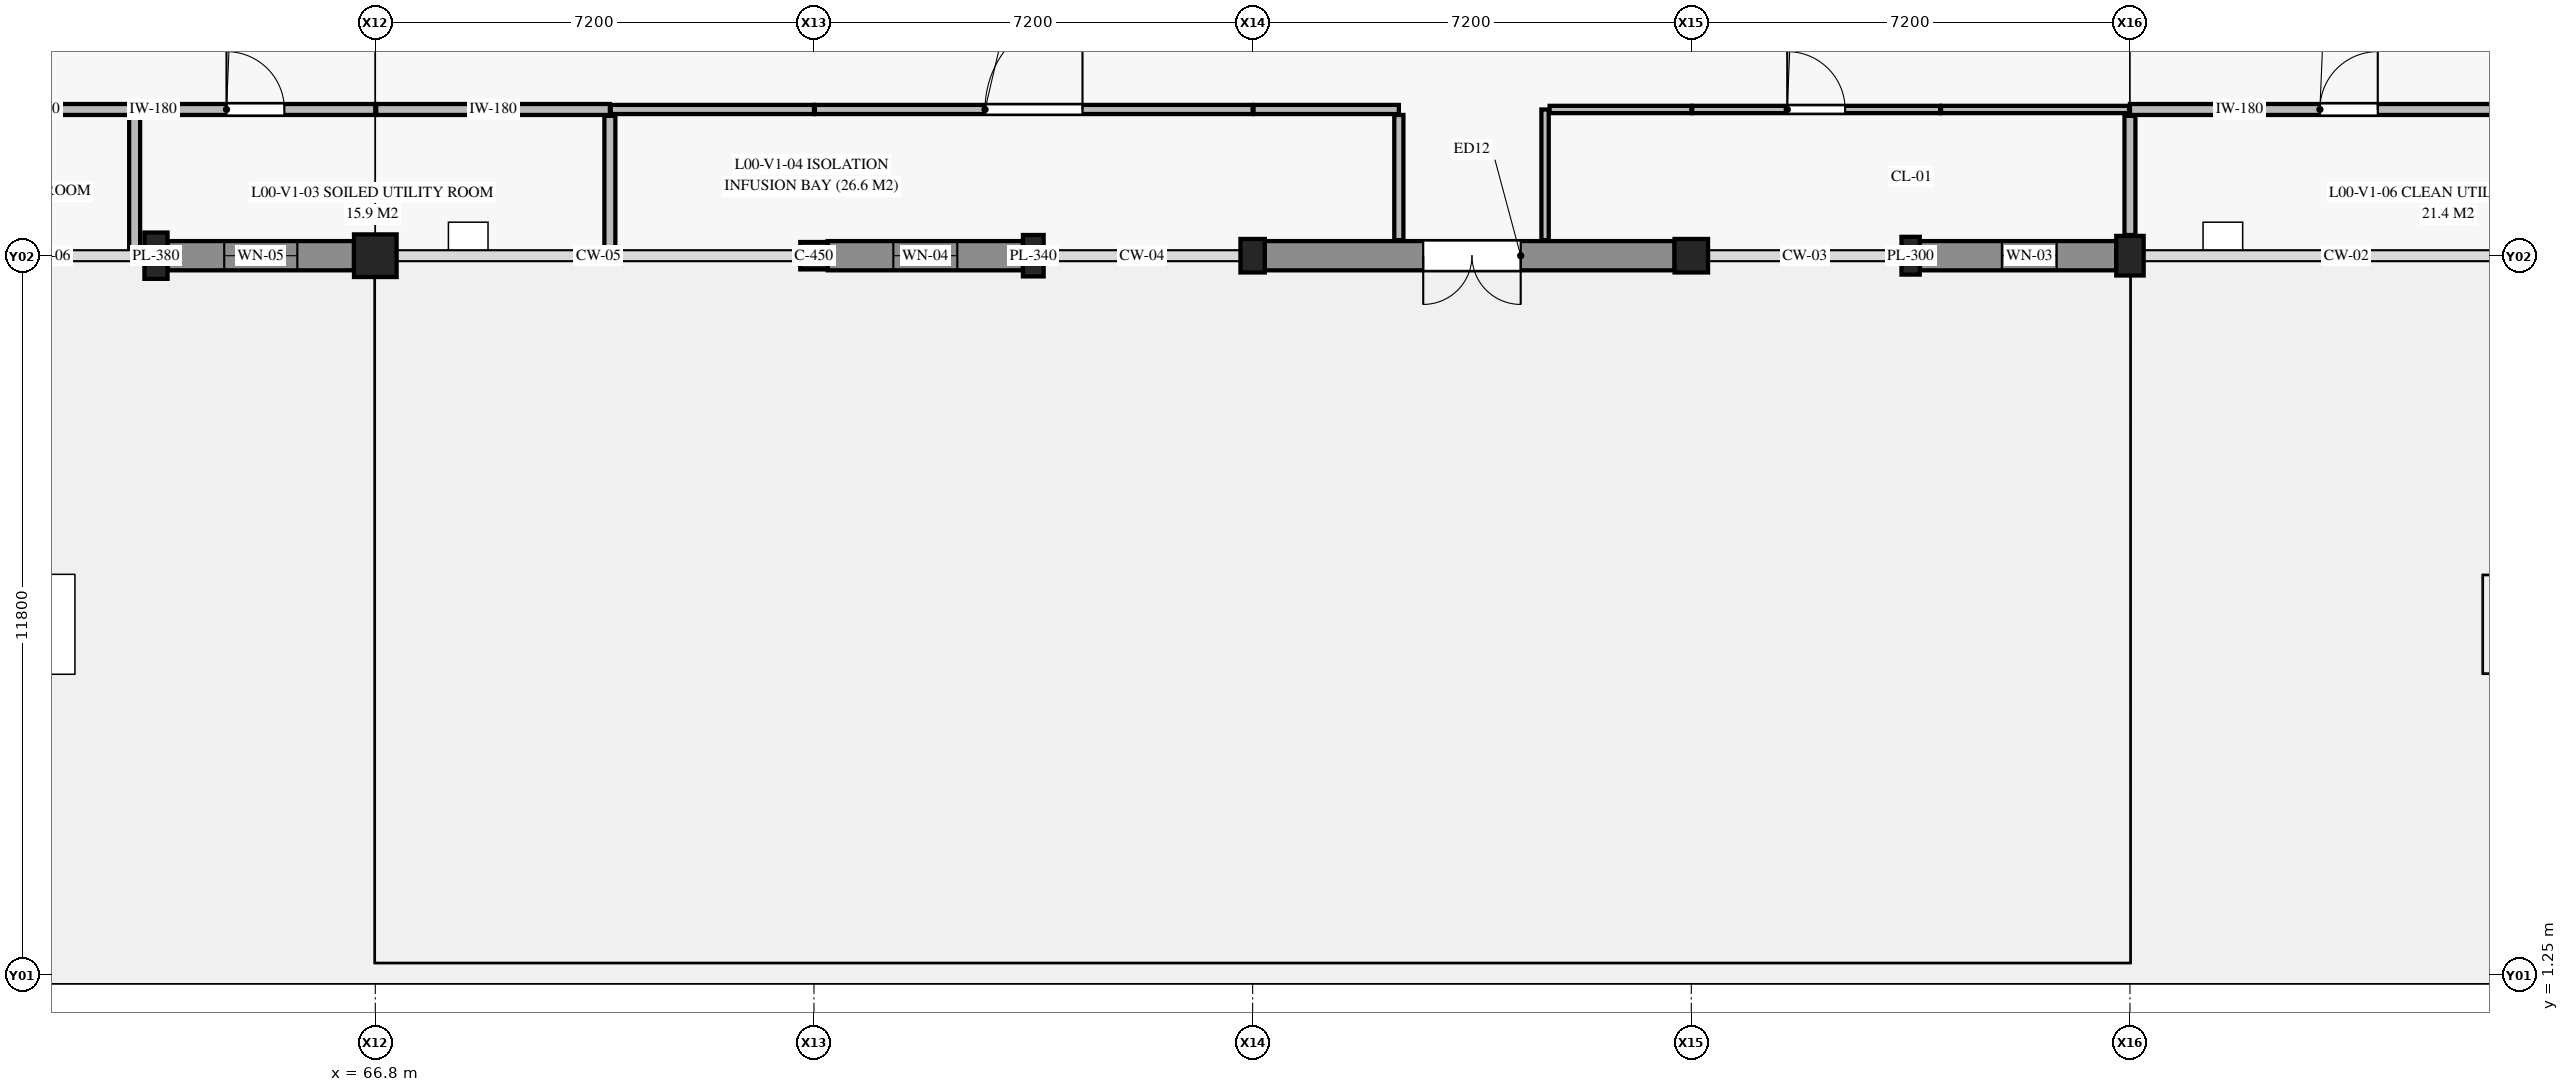
"""IFC4 building model, lengths in metres.
Left out: names, types, materials, properties, quantities, classifications, styles, units other than length and angle.
Written with IfcOpenShell. Run it as: python <this file> out.ifc"""

import sys

from ifc_helpers import new_model, si_unit, direction, frame, frame_2d, origin, origin_2d, place, context, subcontext, project, spatial, rectangle, extrude, element, fill, save


model = new_model("IFC4")
c1 = context("Model", 3, precision=1e-05, world=origin(), true_north=direction((0.0, 1.0)))
c2 = subcontext(c1, "Body", "Model", "MODEL_VIEW")
j1 = project(units=[si_unit("LENGTHUNIT", "METRE"), si_unit("PLANEANGLEUNIT", "RADIAN")], contexts=[c1])
p1 = place(None, origin())
s1 = spatial("IfcSite", under=j1, at=p1, CompositionType="ELEMENT")
p2 = place(p1, origin())
s2 = spatial("IfcBuilding", under=s1, at=p2, CompositionType="ELEMENT")
p3 = place(p2, origin())
s3 = spatial("IfcBuildingStorey", under=s2, at=p3, CompositionType="ELEMENT", Elevation=0.0)
p4 = place(p3, frame((66.8, 13.05, 0.0), z_axis=(0.0, 0.0, 1.0), x_axis=(1.0, 0.0, 0.0)))
e1 = element("IfcColumn", 1, at=p4, inside=s3, PredefinedType="COLUMN", context=c2, shape_type="SweptSolid", body=[
    extrude(rectangle(XDim=0.7, YDim=0.7, at=origin_2d()), origin(), (0.0, 0.0, 1.0), 4.8),
])
p5 = place(p3, frame((74.0, 13.05, 0.0), z_axis=(0.0, 0.0, 1.0), x_axis=(1.0, 0.0, 0.0)))
e2 = element("IfcColumn", 2, at=p5, inside=s3, PredefinedType="COLUMN", context=c2, shape_type="SweptSolid", body=[
    extrude(rectangle(XDim=0.45, YDim=0.45, at=origin_2d()), origin(), (0.0, 0.0, 1.0), 4.8),
])
p6 = place(p3, frame((81.2, 13.05, 0.0), z_axis=(0.0, 0.0, 1.0), x_axis=(1.0, 0.0, 0.0)))
e3 = element("IfcColumn", 3, at=p6, inside=s3, PredefinedType="COLUMN", context=c2, shape_type="SweptSolid", body=[
    extrude(rectangle(XDim=0.4, YDim=0.55, at=origin_2d()), origin(), (0.0, 0.0, 1.0), 4.8),
])
p7 = place(p3, frame((88.4, 13.05, 0.0), z_axis=(0.0, 0.0, 1.0), x_axis=(1.0, 0.0, 0.0)))
e4 = element("IfcColumn", 4, at=p7, inside=s3, PredefinedType="COLUMN", context=c2, shape_type="SweptSolid", body=[
    extrude(rectangle(XDim=0.55, YDim=0.55, at=origin_2d()), origin(), (0.0, 0.0, 1.0), 4.8),
])
p8 = place(p3, frame((95.6, 13.05, 0.0), z_axis=(0.0, 0.0, 1.0), x_axis=(1.0, 0.0, 0.0)))
e5 = element("IfcColumn", 5, at=p8, inside=s3, PredefinedType="COLUMN", context=c2, shape_type="SweptSolid", body=[
    extrude(rectangle(XDim=0.45, YDim=0.65, at=origin_2d()), origin(), (0.0, 0.0, 1.0), 4.8),
])
p9 = place(p3, frame((63.2, 13.05, 0.0), z_axis=(0.0, 0.0, 1.0), x_axis=(1.0, 0.0, 0.0)))
e6 = element("IfcColumn", 6, at=p9, inside=s3, PredefinedType="PILASTER", context=c2, shape_type="SweptSolid", body=[
    extrude(rectangle(XDim=0.38, YDim=0.76, at=origin_2d()), origin(), (0.0, 0.0, 1.0), 4.8),
])
p10 = place(p3, frame((77.6, 13.05, 0.0), z_axis=(0.0, 0.0, 1.0), x_axis=(1.0, 0.0, 0.0)))
e7 = element("IfcColumn", 7, at=p10, inside=s3, PredefinedType="PILASTER", context=c2, shape_type="SweptSolid", body=[
    extrude(rectangle(XDim=0.34, YDim=0.68, at=origin_2d()), origin(), (0.0, 0.0, 1.0), 4.8),
])
p11 = place(p3, frame((92.0, 13.05, 0.0), z_axis=(0.0, 0.0, 1.0), x_axis=(1.0, 0.0, 0.0)))
e8 = element("IfcColumn", 8, at=p11, inside=s3, PredefinedType="PILASTER", context=c2, shape_type="SweptSolid", body=[
    extrude(rectangle(XDim=0.3, YDim=0.62, at=origin_2d()), origin(), (0.0, 0.0, 1.0), 4.8),
])
p12 = place(p3, frame((95.375, 13.05, 0.0), z_axis=(0.0, 0.0, 1.0), x_axis=(-1.0, 0.0, 0.0)))
e9 = element("IfcWall", 9, at=p12, inside=s3, PredefinedType="SOLIDWALL", context=c2, shape_type="SweptSolid", body=[
    extrude(rectangle(XDim=3.225, YDim=0.48, at=frame_2d((1.613, 0.0))), origin(), (0.0, 0.0, 1.0), 3.73),
])
p13 = place(p12, frame((0.978, 0.0, 0.9)))
e10 = element("IfcOpeningElement", 10, at=p13, cuts=e9, PredefinedType="OPENING", context=c2, shape_type="SweptSolid", body=[
    extrude(rectangle(XDim=0.9, YDim=1.8, at=frame_2d((0.45, 0.9))), frame((0.0, 0.25, 0.0), z_axis=(0.0, -1.0, 0.0), x_axis=(1.0, 0.0, 0.0)), (0.0, 0.0, 1.0), 0.5),
])
p14 = place(p3, frame((88.125, 13.05, 0.0), z_axis=(0.0, 0.0, 1.0), x_axis=(-1.0, 0.0, 0.0)))
e11 = element("IfcWall", 11, at=p14, inside=s3, PredefinedType="SOLIDWALL", context=c2, shape_type="SweptSolid", body=[
    extrude(rectangle(XDim=6.725, YDim=0.48, at=frame_2d((3.363, 0.0))), origin(), (0.0, 0.0, 1.0), 3.73),
])
p15 = place(p14, frame((2.525, 0.0, 0.0)))
e12 = element("IfcOpeningElement", 12, at=p15, cuts=e11, PredefinedType="OPENING", context=c2, shape_type="SweptSolid", body=[
    extrude(rectangle(XDim=1.6, YDim=2.3, at=frame_2d((0.8, 1.15))), frame((0.0, 0.25, 0.0), z_axis=(0.0, -1.0, 0.0), x_axis=(1.0, 0.0, 0.0)), (0.0, 0.0, 1.0), 0.5),
])
p16 = place(p3, frame((77.43, 13.05, 0.0), z_axis=(0.0, 0.0, 1.0), x_axis=(-1.0, 0.0, 0.0)))
e13 = element("IfcWall", 13, at=p16, inside=s3, PredefinedType="SOLIDWALL", context=c2, shape_type="SweptSolid", body=[
    extrude(rectangle(XDim=3.205, YDim=0.48, at=frame_2d((1.603, 0.0))), origin(), (0.0, 0.0, 1.0), 3.73),
])
p17 = place(p16, frame((1.077, 0.0, 0.9)))
e14 = element("IfcOpeningElement", 14, at=p17, cuts=e13, PredefinedType="OPENING", context=c2, shape_type="SweptSolid", body=[
    extrude(rectangle(XDim=1.05, YDim=1.8, at=frame_2d((0.525, 0.9))), frame((0.0, 0.25, 0.0), z_axis=(0.0, -1.0, 0.0), x_axis=(1.0, 0.0, 0.0)), (0.0, 0.0, 1.0), 0.5),
])
p18 = place(p3, frame((66.45, 13.05, 0.0), z_axis=(0.0, 0.0, 1.0), x_axis=(-1.0, 0.0, 0.0)))
e15 = element("IfcWall", 15, at=p18, inside=s3, PredefinedType="SOLIDWALL", context=c2, shape_type="SweptSolid", body=[
    extrude(rectangle(XDim=3.06, YDim=0.48, at=frame_2d((1.53, 0.0))), origin(), (0.0, 0.0, 1.0), 3.73),
])
p19 = place(p18, frame((0.93, 0.0, 0.9)))
e16 = element("IfcOpeningElement", 16, at=p19, cuts=e15, PredefinedType="OPENING", context=c2, shape_type="SweptSolid", body=[
    extrude(rectangle(XDim=1.2, YDim=1.8, at=frame_2d((0.6, 0.9))), frame((0.0, 0.25, 0.0), z_axis=(0.0, -1.0, 0.0), x_axis=(1.0, 0.0, 0.0)), (0.0, 0.0, 1.0), 0.5),
])
p20 = place(p3, frame((59.615, 15.45, 0.0), z_axis=(0.0, 0.0, 1.0), x_axis=(1.0, 0.0, 0.0)))
e17 = element("IfcWall", 17, at=p20, inside=s3, PredefinedType="PLUMBINGWALL", context=c2, shape_type="SweptSolid", body=[
    extrude(rectangle(XDim=3.235, YDim=0.18, at=frame_2d((1.618, 0.0))), origin(), (0.0, 0.0, 1.0), 3.955),
])
p21 = place(p3, frame((62.865, 15.45, 0.0), z_axis=(0.0, 0.0, 1.0), x_axis=(1.0, 0.0, 0.0)))
e18 = element("IfcWall", 18, at=p21, inside=s3, PredefinedType="PLUMBINGWALL", context=c2, shape_type="SweptSolid", body=[
    extrude(rectangle(XDim=3.935, YDim=0.18, at=frame_2d((1.968, 0.0))), origin(), (0.0, 0.0, 1.0), 3.735),
])
p22 = place(p21, frame((1.492, 0.0, 0.0)))
e19 = element("IfcOpeningElement", 19, at=p22, cuts=e18, PredefinedType="OPENING", context=c2, shape_type="SweptSolid", body=[
    extrude(rectangle(XDim=0.95, YDim=2.1, at=frame_2d((0.475, 1.05))), frame((0.0, 0.1, 0.0), z_axis=(0.0, -1.0, 0.0), x_axis=(1.0, 0.0, 0.0)), (0.0, 0.0, 1.0), 0.2),
])
p23 = place(p3, frame((66.815, 15.45, 0.0), z_axis=(0.0, 0.0, 1.0), x_axis=(1.0, 0.0, 0.0)))
e20 = element("IfcWall", 20, at=p23, inside=s3, PredefinedType="PLUMBINGWALL", context=c2, shape_type="SweptSolid", body=[
    extrude(rectangle(XDim=3.835, YDim=0.18, at=frame_2d((1.917, 0.0))), origin(), (0.0, 0.0, 1.0), 3.735),
])
p24 = place(p3, frame((95.6, 15.45, 0.0), z_axis=(0.0, 0.0, 1.0), x_axis=(1.0, 0.0, 0.0)))
e21 = element("IfcWall", 21, at=p24, inside=s3, PredefinedType="PLUMBINGWALL", context=c2, shape_type="SweptSolid", body=[
    extrude(rectangle(XDim=7.185, YDim=0.18, at=frame_2d((3.592, 0.0))), origin(), (0.0, 0.0, 1.0), 3.735),
])
p25 = place(p24, frame((3.117, 0.0, 0.0)))
e22 = element("IfcOpeningElement", 22, at=p25, cuts=e21, PredefinedType="OPENING", context=c2, shape_type="SweptSolid", body=[
    extrude(rectangle(XDim=0.95, YDim=2.1, at=frame_2d((0.475, 1.05))), frame((0.0, 0.1, 0.0), z_axis=(0.0, -1.0, 0.0), x_axis=(1.0, 0.0, 0.0)), (0.0, 0.0, 1.0), 0.2),
])
p26 = place(p3, frame((70.665, 15.45, 0.0), z_axis=(0.0, 0.0, 1.0), x_axis=(1.0, 0.0, 0.0)))
e23 = element("IfcWall", 23, at=p26, inside=s3, PredefinedType="PARTITIONING", context=c2, shape_type="SweptSolid", body=[
    extrude(rectangle(XDim=3.335, YDim=0.15, at=frame_2d((1.667, 0.0))), origin(), (0.0, 0.0, 1.0), 3.835),
])
p27 = place(p3, frame((74.015, 15.45, 0.0), z_axis=(0.0, 0.0, 1.0), x_axis=(1.0, 0.0, 0.0)))
e24 = element("IfcWall", 24, at=p27, inside=s3, PredefinedType="PARTITIONING", context=c2, shape_type="SweptSolid", body=[
    extrude(rectangle(XDim=7.185, YDim=0.15, at=frame_2d((3.593, 0.0))), origin(), (0.0, 0.0, 1.0), 3.835),
])
p28 = place(p27, frame((2.792, 0.0, 0.0)))
e25 = element("IfcOpeningElement", 25, at=p28, cuts=e24, PredefinedType="OPENING", context=c2, shape_type="SweptSolid", body=[
    extrude(rectangle(XDim=1.6, YDim=2.25, at=frame_2d((0.8, 1.125))), frame((0.0, 0.085, 0.0), z_axis=(0.0, -1.0, 0.0), x_axis=(1.0, 0.0, 0.0)), (0.0, 0.0, 1.0), 0.17),
])
p29 = place(p3, frame((81.215, 15.45, 0.0), z_axis=(0.0, 0.0, 1.0), x_axis=(1.0, 0.0, 0.0)))
e26 = element("IfcWall", 26, at=p29, inside=s3, PredefinedType="PARTITIONING", context=c2, shape_type="SweptSolid", body=[
    extrude(rectangle(XDim=2.385, YDim=0.15, at=frame_2d((1.192, 0.0))), origin(), (0.0, 0.0, 1.0), 3.955),
])
p30 = place(p3, frame((83.6, 13.305, 0.0), z_axis=(0.0, 0.0, 1.0), x_axis=(0.0, 1.0, 0.0)))
e27 = element("IfcWall", 27, at=p30, inside=s3, PredefinedType="PARTITIONING", context=c2, shape_type="SweptSolid", body=[
    extrude(rectangle(XDim=2.055, YDim=0.15, at=frame_2d((1.028, 0.0))), origin(), (0.0, 0.0, 1.0), 4.55),
])
p31 = place(p3, frame((92.5, 15.45, 0.0), z_axis=(0.0, 0.0, 1.0), x_axis=(1.0, 0.0, 0.0)))
e28 = element("IfcWall", 28, at=p31, inside=s3, PredefinedType="PARTITIONING", context=c2, shape_type="SweptSolid", body=[
    extrude(rectangle(XDim=3.085, YDim=0.12, at=frame_2d((1.542, 0.0))), origin(), (0.0, 0.0, 1.0), 3.985),
])
p32 = place(p3, frame((86.0, 13.305, 0.0), z_axis=(0.0, 0.0, 1.0), x_axis=(0.0, 1.0, 0.0)))
e29 = element("IfcWall", 29, at=p32, inside=s3, PredefinedType="PARTITIONING", context=c2, shape_type="SweptSolid", body=[
    extrude(rectangle(XDim=2.145, YDim=0.12, at=frame_2d((1.073, 0.0))), origin(), (0.0, 0.0, 1.0), 4.115),
])
p33 = place(p3, frame((86.075, 15.45, 0.0), z_axis=(0.0, 0.0, 1.0), x_axis=(1.0, 0.0, 0.0)))
e30 = element("IfcWall", 30, at=p33, inside=s3, PredefinedType="PARTITIONING", context=c2, shape_type="SweptSolid", body=[
    extrude(rectangle(XDim=2.325, YDim=0.12, at=frame_2d((1.163, 0.0))), origin(), (0.0, 0.0, 1.0), 3.955),
])
p34 = place(p3, frame((88.415, 15.45, 0.0), z_axis=(0.0, 0.0, 1.0), x_axis=(1.0, 0.0, 0.0)))
e31 = element("IfcWall", 31, at=p34, inside=s3, PredefinedType="PARTITIONING", context=c2, shape_type="SweptSolid", body=[
    extrude(rectangle(XDim=4.07, YDim=0.12, at=frame_2d((2.035, 0.0))), origin(), (0.0, 0.0, 1.0), 3.955),
])
p35 = place(p34, frame((1.56, 0.0, 0.0)))
e32 = element("IfcOpeningElement", 32, at=p35, cuts=e31, PredefinedType="OPENING", context=c2, shape_type="SweptSolid", body=[
    extrude(rectangle(XDim=0.95, YDim=2.1, at=frame_2d((0.475, 1.05))), frame((0.0, 0.07, 0.0), z_axis=(0.0, -1.0, 0.0), x_axis=(1.0, 0.0, 0.0)), (0.0, 0.0, 1.0), 0.14),
])
for number, where, z_axis, x_axis in (
    (33, (62.85, 13.155, 0.0), (0.0, 0.0, 1.0), (0.0, 1.0, 0.0)),
    (34, (70.65, 13.155, 0.0), (0.0, 0.0, 1.0), (0.0, 1.0, 0.0)),
):
    element("IfcWall", number, at=place(p3, frame(where, z_axis=z_axis, x_axis=x_axis)), inside=s3, PredefinedType="PLUMBINGWALL", context=c2, shape_type="SweptSolid", body=[
        extrude(rectangle(XDim=2.19, YDim=0.18, at=frame_2d((1.095, 0.0))), origin(), (0.0, 0.0, 1.0), 4.55),
    ])
p36 = place(p3, frame((95.6, 13.39, 0.0), z_axis=(0.0, 0.0, 1.0), x_axis=(0.0, 1.0, 0.0)))
e35 = element("IfcWall", 35, at=p36, inside=s3, PredefinedType="PLUMBINGWALL", context=c2, shape_type="SweptSolid", body=[
    extrude(rectangle(XDim=1.955, YDim=0.18, at=frame_2d((0.978, 0.0))), origin(), (0.0, 0.0, 1.0), 3.985),
])
p37 = place(p13, origin())
e36 = element("IfcWindow", 36, at=p37, inside=s3, PartitioningType="SINGLE_PANEL", PredefinedType="WINDOW", context=c2, shape_type="SweptSolid", body=[
    extrude(rectangle(XDim=0.9, YDim=1.8, at=frame_2d((0.45, 0.9))), frame((0.0, 0.03, 0.0), z_axis=(0.0, -1.0, 0.0), x_axis=(1.0, 0.0, 0.0)), (0.0, 0.0, 1.0), 0.06),
])
fill(e10, e36)
p38 = place(p15, origin())
e37 = element("IfcDoor", 37, at=p38, inside=s3, OperationType="DOUBLE_DOOR_SINGLE_SWING", PredefinedType="DOOR", context=c2, shape_type="SweptSolid", body=[
    extrude(rectangle(XDim=1.6, YDim=2.3, at=frame_2d((0.8, 1.15))), frame((0.0, 0.025, 0.0), z_axis=(0.0, -1.0, 0.0), x_axis=(1.0, 0.0, 0.0)), (0.0, 0.0, 1.0), 0.05),
])
fill(e12, e37)
p39 = place(p17, origin())
e38 = element("IfcWindow", 38, at=p39, inside=s3, PartitioningType="SINGLE_PANEL", PredefinedType="WINDOW", context=c2, shape_type="SweptSolid", body=[
    extrude(rectangle(XDim=1.05, YDim=1.8, at=frame_2d((0.525, 0.9))), frame((0.0, 0.03, 0.0), z_axis=(0.0, -1.0, 0.0), x_axis=(1.0, 0.0, 0.0)), (0.0, 0.0, 1.0), 0.06),
])
fill(e14, e38)
p40 = place(p19, origin())
e39 = element("IfcWindow", 39, at=p40, inside=s3, PartitioningType="SINGLE_PANEL", PredefinedType="WINDOW", context=c2, shape_type="SweptSolid", body=[
    extrude(rectangle(XDim=1.2, YDim=1.8, at=frame_2d((0.6, 0.9))), frame((0.0, 0.03, 0.0), z_axis=(0.0, -1.0, 0.0), x_axis=(1.0, 0.0, 0.0)), (0.0, 0.0, 1.0), 0.06),
])
fill(e16, e39)
p41 = place(p22, origin())
e40 = element("IfcDoor", 40, at=p41, inside=s3, OperationType="SINGLE_SWING_LEFT", PredefinedType="DOOR", context=c2, shape_type="SweptSolid", body=[
    extrude(rectangle(XDim=0.95, YDim=2.1, at=frame_2d((0.475, 1.05))), frame((0.0, 0.025, 0.0), z_axis=(0.0, -1.0, 0.0), x_axis=(1.0, 0.0, 0.0)), (0.0, 0.0, 1.0), 0.05),
])
fill(e19, e40)
p42 = place(p28, origin())
e41 = element("IfcDoor", 41, at=p42, inside=s3, OperationType="SINGLE_SWING_RIGHT", PredefinedType="DOOR", context=c2, shape_type="SweptSolid", body=[
    extrude(rectangle(XDim=1.6, YDim=2.25, at=frame_2d((0.8, 1.125))), frame((0.0, 0.025, 0.0), z_axis=(0.0, -1.0, 0.0), x_axis=(1.0, 0.0, 0.0)), (0.0, 0.0, 1.0), 0.05),
])
fill(e25, e41)
p43 = place(p35, origin())
e42 = element("IfcDoor", 42, at=p43, inside=s3, OperationType="SINGLE_SWING_LEFT", PredefinedType="DOOR", context=c2, shape_type="SweptSolid", body=[
    extrude(rectangle(XDim=0.95, YDim=2.1, at=frame_2d((0.475, 1.05))), frame((0.0, 0.025, 0.0), z_axis=(0.0, -1.0, 0.0), x_axis=(1.0, 0.0, 0.0)), (0.0, 0.0, 1.0), 0.05),
])
fill(e32, e42)
p44 = place(p25, origin())
e43 = element("IfcDoor", 43, at=p44, inside=s3, OperationType="SINGLE_SWING_RIGHT", PredefinedType="DOOR", context=c2, shape_type="SweptSolid", body=[
    extrude(rectangle(XDim=0.95, YDim=2.1, at=frame_2d((0.475, 1.05))), frame((0.0, 0.025, 0.0), z_axis=(0.0, -1.0, 0.0), x_axis=(1.0, 0.0, 0.0)), (0.0, 0.0, 1.0), 0.05),
])
fill(e22, e43)
save(model, sys.argv[1])
